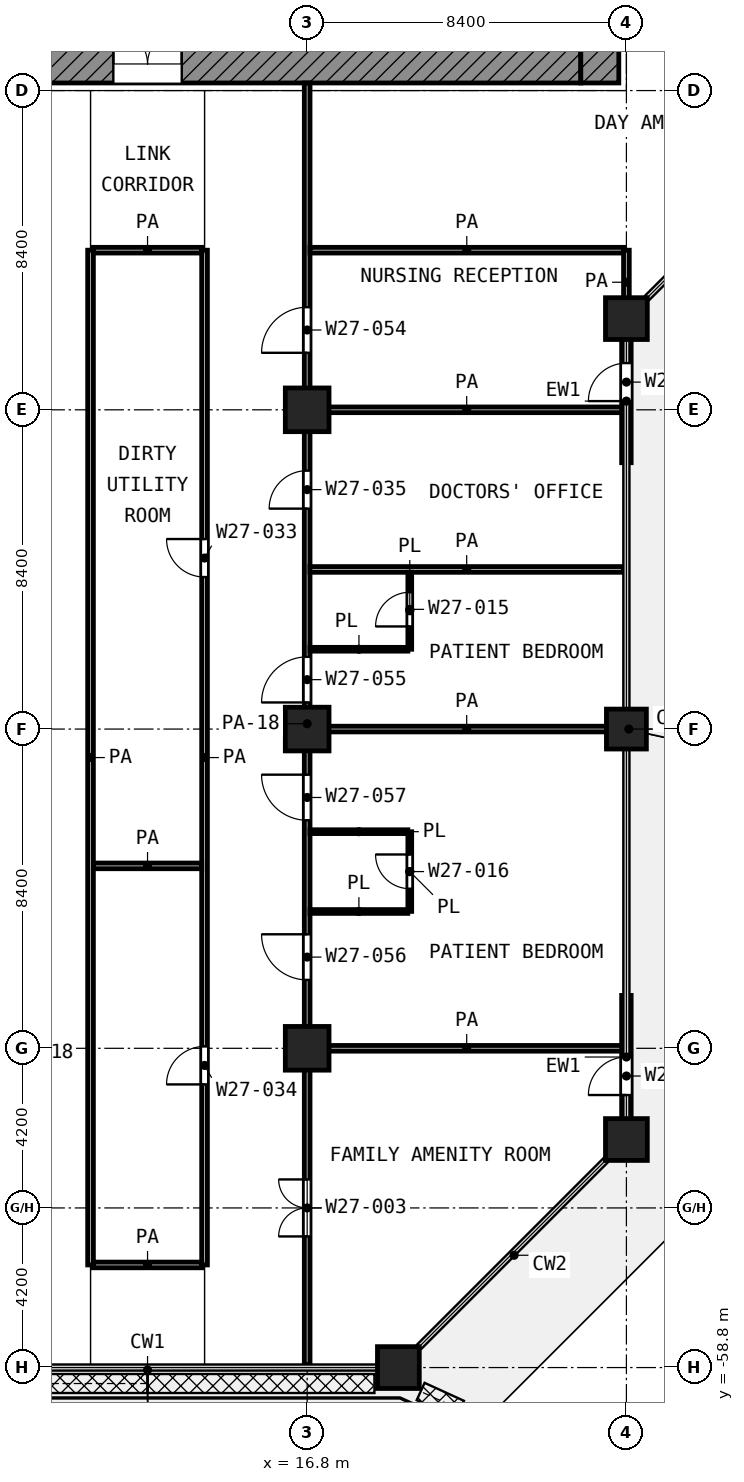
"""IFC4 building model, lengths in metres.
Left out: names, types, materials, properties, quantities, classifications, styles, units other than length and angle.
Written with IfcOpenShell. Run it as: python <this file> out.ifc"""

import sys

from ifc_helpers import new_model, si_unit, direction, frame, frame_2d, origin, origin_2d, place, context, subcontext, project, spatial, rectangle, extrude, element, fill, save


model = new_model("IFC4")
c1 = context("Model", 3, precision=1e-05, world=origin(), true_north=direction((0.0, 1.0)))
c2 = subcontext(c1, "Body", "Model", "MODEL_VIEW")
j1 = project(units=[si_unit("LENGTHUNIT", "METRE"), si_unit("PLANEANGLEUNIT", "RADIAN")], contexts=[c1])
p1 = place(None, origin())
s1 = spatial("IfcSite", under=j1, at=p1, CompositionType="ELEMENT")
p2 = place(p1, origin())
s2 = spatial("IfcBuilding", under=s1, at=p2, CompositionType="ELEMENT")
p3 = place(p2, frame((0.0, 0.0, 119.8)))
s3 = spatial("IfcBuildingStorey", under=s2, at=p3, CompositionType="ELEMENT", Elevation=119.8)
p4 = place(p3, frame((25.2, -31.2, 0.0), z_axis=(0.0, 0.0, 1.0), x_axis=(1.0, 0.0, 0.0)))
e1 = element("IfcColumn", 1, at=p4, inside=s3, PredefinedType="COLUMN", context=c2, shape_type="SweptSolid", body=[
    extrude(rectangle(XDim=1.1, YDim=1.1, at=origin_2d()), origin(), (0.0, 0.0, 1.0), 4.2),
])
for number, where, z_axis, x_axis in (
    (2, (16.8, -33.6, 0.0), (0.0, 0.0, 1.0), (1.0, 0.0, 0.0)),
    (3, (16.8, -42.0, 0.0), (0.0, 0.0, 1.0), (1.0, 0.0, 0.0)),
):
    element("IfcColumn", number, at=place(p3, frame(where, z_axis=z_axis, x_axis=x_axis)), inside=s3, PredefinedType="COLUMN", context=c2, shape_type="SweptSolid", body=[
        extrude(rectangle(XDim=1.15, YDim=1.15, at=origin_2d()), origin(), (0.0, 0.0, 1.0), 4.2),
    ])
p5 = place(p3, frame((25.2, -42.0, 0.0), z_axis=(0.0, 0.0, 1.0), x_axis=(1.0, 0.0, 0.0)))
e4 = element("IfcColumn", 4, at=p5, inside=s3, PredefinedType="COLUMN", context=c2, shape_type="SweptSolid", body=[
    extrude(rectangle(XDim=1.05, YDim=1.05, at=origin_2d()), origin(), (0.0, 0.0, 1.0), 4.2),
])
p6 = place(p3, frame((16.8, -50.4, 0.0), z_axis=(0.0, 0.0, 1.0), x_axis=(1.0, 0.0, 0.0)))
e5 = element("IfcColumn", 5, at=p6, inside=s3, PredefinedType="COLUMN", context=c2, shape_type="SweptSolid", body=[
    extrude(rectangle(XDim=1.15, YDim=1.15, at=origin_2d()), origin(), (0.0, 0.0, 1.0), 4.2),
])
for number, where, z_axis, x_axis in (
    (6, (25.2, -52.8, 0.0), (0.0, 0.0, 1.0), (1.0, 0.0, 0.0)),
    (7, (19.2, -58.8, 0.0), (0.0, 0.0, 1.0), (1.0, 0.0, 0.0)),
):
    element("IfcColumn", number, at=place(p3, frame(where, z_axis=z_axis, x_axis=x_axis)), inside=s3, PredefinedType="COLUMN", context=c2, shape_type="SweptSolid", body=[
        extrude(rectangle(XDim=1.1, YDim=1.1, at=origin_2d()), origin(), (0.0, 0.0, 1.0), 4.2),
    ])
p7 = place(p3, frame((25.2, -52.25, 0.0), z_axis=(0.0, 0.0, 1.0), x_axis=(0.0, 1.0, 0.0)))
e8 = element("IfcWall", 8, at=p7, inside=s3, PredefinedType="SOLIDWALL", context=c2, shape_type="SweptSolid", body=[
    extrude(rectangle(XDim=3.242, YDim=0.25, at=frame_2d((1.621, 0.0))), origin(), (0.0, 0.0, 1.0), 3.48),
])
p8 = place(p7, frame((0.621, 0.0, 0.0)))
e9 = element("IfcOpeningElement", 9, at=p8, cuts=e8, PredefinedType="OPENING", context=c2, shape_type="SweptSolid", body=[
    extrude(rectangle(XDim=1.0, YDim=2.1, at=frame_2d((0.5, 1.05))), frame((0.0, 0.135, 0.0), z_axis=(0.0, -1.0, 0.0), x_axis=(1.0, 0.0, 0.0)), (0.0, 0.0, 1.0), 0.27),
])
p9 = place(p3, frame((25.2, -34.992, 0.0), z_axis=(0.0, 0.0, 1.0), x_axis=(0.0, 1.0, 0.0)))
e10 = element("IfcWall", 10, at=p9, inside=s3, PredefinedType="SOLIDWALL", context=c2, shape_type="SweptSolid", body=[
    extrude(rectangle(XDim=3.242, YDim=0.25, at=frame_2d((1.621, 0.0))), origin(), (0.0, 0.0, 1.0), 3.48),
])
p10 = place(p9, frame((1.621, 0.0, 0.0)))
e11 = element("IfcOpeningElement", 11, at=p10, cuts=e10, PredefinedType="OPENING", context=c2, shape_type="SweptSolid", body=[
    extrude(rectangle(XDim=1.0, YDim=2.1, at=frame_2d((0.5, 1.05))), frame((0.0, 0.135, 0.0), z_axis=(0.0, -1.0, 0.0), x_axis=(1.0, 0.0, 0.0)), (0.0, 0.0, 1.0), 0.27),
])
p11 = place(p3, frame((5.4, -24.5, 0.0), z_axis=(0.0, 0.0, 1.0), x_axis=(1.0, 0.0, 0.0)))
e12 = element("IfcWall", 12, at=p11, inside=s3, PredefinedType="SHEAR", context=c2, shape_type="SweptSolid", body=[
    extrude(rectangle(XDim=18.6, YDim=1.0, at=frame_2d((9.3, 0.0))), origin(), (0.0, 0.0, 1.0), 3.6),
])
p12 = place(p11, frame((6.3, 0.0, 0.0)))
e13 = element("IfcOpeningElement", 13, at=p12, cuts=e12, PredefinedType="OPENING", context=c2, shape_type="SweptSolid", body=[
    extrude(rectangle(XDim=1.8, YDim=2.1, at=frame_2d((0.9, 1.05))), frame((0.0, 0.51, 0.0), z_axis=(0.0, -1.0, 0.0), x_axis=(1.0, 0.0, 0.0)), (0.0, 0.0, 1.0), 1.02),
])
p13 = place(p3, frame((24.5, -25.0, 0.0), z_axis=(0.0, 0.0, 1.0), x_axis=(0.0, 1.0, 0.0)))
e14 = element("IfcWall", 14, at=p13, inside=s3, PredefinedType="SHEAR", context=c2, shape_type="SweptSolid", body=[
    extrude(rectangle(XDim=1.0, YDim=1.0, at=frame_2d((0.5, 0.0))), origin(), (0.0, 0.0, 1.0), 3.6),
])
p14 = place(p3, frame((16.875, -46.8, 0.0), z_axis=(0.0, 0.0, 1.0), x_axis=(1.0, 0.0, 0.0)))
e15 = element("IfcWall", 15, at=p14, inside=s3, PredefinedType="PARTITIONING", context=c2, shape_type="SweptSolid", body=[
    extrude(rectangle(XDim=2.573, YDim=0.1, at=frame_2d((1.287, 0.0))), origin(), (0.0, 0.0, 1.0), 3.6),
])
p15 = place(p3, frame((16.875, -44.7, 0.0), z_axis=(0.0, 0.0, 1.0), x_axis=(1.0, 0.0, 0.0)))
e16 = element("IfcWall", 16, at=p15, inside=s3, PredefinedType="PARTITIONING", context=c2, shape_type="SweptSolid", body=[
    extrude(rectangle(XDim=2.574, YDim=0.1, at=frame_2d((1.287, 0.0))), origin(), (0.0, 0.0, 1.0), 3.6),
])
p16 = place(p3, frame((16.875, -39.9, 0.0), z_axis=(0.0, 0.0, 1.0), x_axis=(1.0, 0.0, 0.0)))
e17 = element("IfcWall", 17, at=p16, inside=s3, PredefinedType="PARTITIONING", context=c2, shape_type="SweptSolid", body=[
    extrude(rectangle(XDim=2.575, YDim=0.1, at=frame_2d((1.288, 0.0))), origin(), (0.0, 0.0, 1.0), 3.6),
])
p17 = place(p3, frame((19.5, -46.798, 0.0), z_axis=(0.0, 0.0, 1.0), x_axis=(0.0, 1.0, 0.0)))
e18 = element("IfcWall", 18, at=p17, inside=s3, PredefinedType="PARTITIONING", context=c2, shape_type="SweptSolid", body=[
    extrude(rectangle(XDim=2.096, YDim=0.1, at=frame_2d((1.048, 0.0))), origin(), (0.0, 0.0, 1.0), 3.6),
])
p18 = place(p17, frame((0.598, 0.0, 0.0)))
e19 = element("IfcOpeningElement", 19, at=p18, cuts=e18, PredefinedType="OPENING", context=c2, shape_type="SweptSolid", body=[
    extrude(rectangle(XDim=0.9, YDim=2.1, at=frame_2d((0.45, 1.05))), frame((0.0, 0.06, 0.0), z_axis=(0.0, -1.0, 0.0), x_axis=(1.0, 0.0, 0.0)), (0.0, 0.0, 1.0), 0.12),
])
p19 = place(p3, frame((19.5, -39.9, 0.0), z_axis=(0.0, 0.0, 1.0), x_axis=(0.0, 1.0, 0.0)))
e20 = element("IfcWall", 20, at=p19, inside=s3, PredefinedType="PARTITIONING", context=c2, shape_type="SweptSolid", body=[
    extrude(rectangle(XDim=2.025, YDim=0.1, at=frame_2d((1.012, 0.0))), origin(), (0.0, 0.0, 1.0), 3.6),
])
p20 = place(p19, frame((0.6, 0.0, 0.0)))
e21 = element("IfcOpeningElement", 21, at=p20, cuts=e20, PredefinedType="OPENING", context=c2, shape_type="SweptSolid", body=[
    extrude(rectangle(XDim=0.9, YDim=2.1, at=frame_2d((0.45, 1.05))), frame((0.0, 0.06, 0.0), z_axis=(0.0, -1.0, 0.0), x_axis=(1.0, 0.0, 0.0)), (0.0, 0.0, 1.0), 0.12),
])
p21 = place(p3, frame((11.175, -56.1, 0.0), z_axis=(0.0, 0.0, 1.0), x_axis=(1.0, 0.0, 0.0)))
e22 = element("IfcWall", 22, at=p21, inside=s3, PredefinedType="PARTITIONING", context=c2, shape_type="SweptSolid", body=[
    extrude(rectangle(XDim=2.85, YDim=0.15, at=frame_2d((1.425, 0.0))), origin(), (0.0, 0.0, 1.0), 3.6),
])
p22 = place(p3, frame((16.875, -50.4, 0.0), z_axis=(0.0, 0.0, 1.0), x_axis=(1.0, 0.0, 0.0)))
e23 = element("IfcWall", 23, at=p22, inside=s3, PredefinedType="PARTITIONING", context=c2, shape_type="SweptSolid", body=[
    extrude(rectangle(XDim=8.245, YDim=0.15, at=frame_2d((4.123, 0.0))), origin(), (0.0, 0.0, 1.0), 3.6),
])
p23 = place(p3, frame((11.175, -45.6, 0.0), z_axis=(0.0, 0.0, 1.0), x_axis=(1.0, 0.0, 0.0)))
e24 = element("IfcWall", 24, at=p23, inside=s3, PredefinedType="PARTITIONING", context=c2, shape_type="SweptSolid", body=[
    extrude(rectangle(XDim=2.85, YDim=0.15, at=frame_2d((1.425, 0.0))), origin(), (0.0, 0.0, 1.0), 3.6),
])
for number, where, z_axis, x_axis in (
    (25, (16.875, -42.0, 0.0), (0.0, 0.0, 1.0), (1.0, 0.0, 0.0)),
    (26, (16.875, -37.8, 0.0), (0.0, 0.0, 1.0), (1.0, 0.0, 0.0)),
    (27, (16.875, -33.6, 0.0), (0.0, 0.0, 1.0), (1.0, 0.0, 0.0)),
):
    element("IfcWall", number, at=place(p3, frame(where, z_axis=z_axis, x_axis=x_axis)), inside=s3, PredefinedType="PARTITIONING", context=c2, shape_type="SweptSolid", body=[
        extrude(rectangle(XDim=8.245, YDim=0.15, at=frame_2d((4.123, 0.0))), origin(), (0.0, 0.0, 1.0), 3.6),
    ])
p24 = place(p3, frame((11.175, -29.4, 0.0), z_axis=(0.0, 0.0, 1.0), x_axis=(1.0, 0.0, 0.0)))
e28 = element("IfcWall", 28, at=p24, inside=s3, PredefinedType="PARTITIONING", context=c2, shape_type="SweptSolid", body=[
    extrude(rectangle(XDim=2.85, YDim=0.15, at=frame_2d((1.425, 0.0))), origin(), (0.0, 0.0, 1.0), 3.6),
])
p25 = place(p3, frame((16.875, -29.4, 0.0), z_axis=(0.0, 0.0, 1.0), x_axis=(1.0, 0.0, 0.0)))
e29 = element("IfcWall", 29, at=p25, inside=s3, PredefinedType="PARTITIONING", context=c2, shape_type="SweptSolid", body=[
    extrude(rectangle(XDim=8.25, YDim=0.15, at=frame_2d((4.125, 0.0))), origin(), (0.0, 0.0, 1.0), 3.6),
])
p26 = place(p3, frame((11.1, -56.1, 0.0), z_axis=(0.0, 0.0, 1.0), x_axis=(0.0, 1.0, 0.0)))
e30 = element("IfcWall", 30, at=p26, inside=s3, PredefinedType="PARTITIONING", context=c2, shape_type="SweptSolid", body=[
    extrude(rectangle(XDim=26.7, YDim=0.15, at=frame_2d((13.35, 0.0))), origin(), (0.0, 0.0, 1.0), 3.6),
])
p27 = place(p3, frame((14.1, -56.1, 0.0), z_axis=(0.0, 0.0, 1.0), x_axis=(0.0, 1.0, 0.0)))
e31 = element("IfcWall", 31, at=p27, inside=s3, PredefinedType="PARTITIONING", context=c2, shape_type="SweptSolid", body=[
    extrude(rectangle(XDim=26.7, YDim=0.15, at=frame_2d((13.35, 0.0))), origin(), (0.0, 0.0, 1.0), 3.6),
])
p28 = place(p27, frame((18.1, 0.0, 0.0)))
e32 = element("IfcOpeningElement", 32, at=p28, cuts=e31, PredefinedType="OPENING", context=c2, shape_type="SweptSolid", body=[
    extrude(rectangle(XDim=1.0, YDim=2.1, at=frame_2d((0.5, 1.05))), frame((0.0, 0.085, 0.0), z_axis=(0.0, -1.0, 0.0), x_axis=(1.0, 0.0, 0.0)), (0.0, 0.0, 1.0), 0.17),
])
p29 = place(p27, frame((4.75, 0.0, 0.0)))
e33 = element("IfcOpeningElement", 33, at=p29, cuts=e31, PredefinedType="OPENING", context=c2, shape_type="SweptSolid", body=[
    extrude(rectangle(XDim=1.0, YDim=2.1, at=frame_2d((0.5, 1.05))), frame((0.0, 0.085, 0.0), z_axis=(0.0, -1.0, 0.0), x_axis=(1.0, 0.0, 0.0)), (0.0, 0.0, 1.0), 0.17),
])
p30 = place(p3, frame((16.8, -58.72, 0.0), z_axis=(0.0, 0.0, 1.0), x_axis=(0.0, 1.0, 0.0)))
e34 = element("IfcWall", 34, at=p30, inside=s3, PredefinedType="PARTITIONING", context=c2, shape_type="SweptSolid", body=[
    extrude(rectangle(XDim=33.72, YDim=0.15, at=frame_2d((16.86, 0.0))), origin(), (0.0, 0.0, 1.0), 2.7),
])
p31 = place(p30, frame((26.62, 0.0, 0.0)))
e35 = element("IfcOpeningElement", 35, at=p31, cuts=e34, PredefinedType="OPENING", context=c2, shape_type="SweptSolid", body=[
    extrude(rectangle(XDim=1.2, YDim=2.1, at=frame_2d((0.6, 1.05))), frame((0.0, 0.085, 0.0), z_axis=(0.0, -1.0, 0.0), x_axis=(1.0, 0.0, 0.0)), (0.0, 0.0, 1.0), 0.17),
])
p32 = place(p30, frame((22.52, 0.0, 0.0)))
e36 = element("IfcOpeningElement", 36, at=p32, cuts=e34, PredefinedType="OPENING", context=c2, shape_type="SweptSolid", body=[
    extrude(rectangle(XDim=1.0, YDim=2.1, at=frame_2d((0.5, 1.05))), frame((0.0, 0.085, 0.0), z_axis=(0.0, -1.0, 0.0), x_axis=(1.0, 0.0, 0.0)), (0.0, 0.0, 1.0), 0.17),
])
p33 = place(p30, frame((17.42, 0.0, 0.0)))
e37 = element("IfcOpeningElement", 37, at=p33, cuts=e34, PredefinedType="OPENING", context=c2, shape_type="SweptSolid", body=[
    extrude(rectangle(XDim=1.2, YDim=2.1, at=frame_2d((0.6, 1.05))), frame((0.0, 0.085, 0.0), z_axis=(0.0, -1.0, 0.0), x_axis=(1.0, 0.0, 0.0)), (0.0, 0.0, 1.0), 0.17),
])
p34 = place(p30, frame((10.12, 0.0, 0.0)))
e38 = element("IfcOpeningElement", 38, at=p34, cuts=e34, PredefinedType="OPENING", context=c2, shape_type="SweptSolid", body=[
    extrude(rectangle(XDim=1.2, YDim=2.1, at=frame_2d((0.6, 1.05))), frame((0.0, 0.085, 0.0), z_axis=(0.0, -1.0, 0.0), x_axis=(1.0, 0.0, 0.0)), (0.0, 0.0, 1.0), 0.17),
])
p35 = place(p30, frame((14.32, 0.0, 0.0)))
e39 = element("IfcOpeningElement", 39, at=p35, cuts=e34, PredefinedType="OPENING", context=c2, shape_type="SweptSolid", body=[
    extrude(rectangle(XDim=1.2, YDim=2.1, at=frame_2d((0.6, 1.05))), frame((0.0, 0.085, 0.0), z_axis=(0.0, -1.0, 0.0), x_axis=(1.0, 0.0, 0.0)), (0.0, 0.0, 1.0), 0.17),
])
p36 = place(p30, frame((3.37, 0.0, 0.0)))
e40 = element("IfcOpeningElement", 40, at=p36, cuts=e34, PredefinedType="OPENING", context=c2, shape_type="SweptSolid", body=[
    extrude(rectangle(XDim=1.5, YDim=2.1, at=frame_2d((0.75, 1.05))), frame((0.0, 0.085, 0.0), z_axis=(0.0, -1.0, 0.0), x_axis=(1.0, 0.0, 0.0)), (0.0, 0.0, 1.0), 0.17),
])
p37 = place(p3, frame((25.2, -31.087, 0.0), z_axis=(0.0, 0.0, 1.0), x_axis=(0.0, 1.0, 0.0)))
e41 = element("IfcWall", 41, at=p37, inside=s3, PredefinedType="PARTITIONING", context=c2, shape_type="SweptSolid", body=[
    extrude(rectangle(XDim=1.687, YDim=0.15, at=frame_2d((0.844, 0.0))), origin(), (0.0, 0.0, 1.0), 3.6),
])
p38 = place(p8, origin())
e42 = element("IfcDoor", 42, at=p38, inside=s3, OperationType="SINGLE_SWING_LEFT", PredefinedType="DOOR", context=c2, shape_type="SweptSolid", body=[
    extrude(rectangle(XDim=1.0, YDim=2.1, at=frame_2d((0.5, 1.05))), frame((0.0, 0.025, 0.0), z_axis=(0.0, -1.0, 0.0), x_axis=(1.0, 0.0, 0.0)), (0.0, 0.0, 1.0), 0.05),
])
fill(e9, e42)
p39 = place(p10, origin())
e43 = element("IfcDoor", 43, at=p39, inside=s3, OperationType="SINGLE_SWING_LEFT", PredefinedType="DOOR", context=c2, shape_type="SweptSolid", body=[
    extrude(rectangle(XDim=1.0, YDim=2.1, at=frame_2d((0.5, 1.05))), frame((0.0, 0.025, 0.0), z_axis=(0.0, -1.0, 0.0), x_axis=(1.0, 0.0, 0.0)), (0.0, 0.0, 1.0), 0.05),
])
fill(e11, e43)
p40 = place(p12, origin())
e44 = element("IfcDoor", 44, at=p40, inside=s3, OperationType="DOUBLE_DOOR_SINGLE_SWING", PredefinedType="DOOR", context=c2, shape_type="SweptSolid", body=[
    extrude(rectangle(XDim=1.8, YDim=2.1, at=frame_2d((0.9, 1.05))), frame((0.0, 0.025, 0.0), z_axis=(0.0, -1.0, 0.0), x_axis=(1.0, 0.0, 0.0)), (0.0, 0.0, 1.0), 0.05),
])
fill(e13, e44)
p41 = place(p28, origin())
e45 = element("IfcDoor", 45, at=p41, inside=s3, OperationType="SINGLE_SWING_RIGHT", PredefinedType="DOOR", context=c2, shape_type="SweptSolid", body=[
    extrude(rectangle(XDim=1.0, YDim=2.1, at=frame_2d((0.5, 1.05))), frame((0.0, 0.025, 0.0), z_axis=(0.0, -1.0, 0.0), x_axis=(1.0, 0.0, 0.0)), (0.0, 0.0, 1.0), 0.05),
])
fill(e32, e45)
p42 = place(p29, origin())
e46 = element("IfcDoor", 46, at=p42, inside=s3, OperationType="SINGLE_SWING_LEFT", PredefinedType="DOOR", context=c2, shape_type="SweptSolid", body=[
    extrude(rectangle(XDim=1.0, YDim=2.1, at=frame_2d((0.5, 1.05))), frame((0.0, 0.025, 0.0), z_axis=(0.0, -1.0, 0.0), x_axis=(1.0, 0.0, 0.0)), (0.0, 0.0, 1.0), 0.05),
])
fill(e33, e46)
p43 = place(p31, origin())
e47 = element("IfcDoor", 47, at=p43, inside=s3, OperationType="SINGLE_SWING_LEFT", PredefinedType="DOOR", context=c2, shape_type="SweptSolid", body=[
    extrude(rectangle(XDim=1.2, YDim=2.1, at=frame_2d((0.6, 1.05))), frame((0.0, 0.025, 0.0), z_axis=(0.0, -1.0, 0.0), x_axis=(1.0, 0.0, 0.0)), (0.0, 0.0, 1.0), 0.05),
])
fill(e35, e47)
p44 = place(p32, origin())
e48 = element("IfcDoor", 48, at=p44, inside=s3, OperationType="SINGLE_SWING_LEFT", PredefinedType="DOOR", context=c2, shape_type="SweptSolid", body=[
    extrude(rectangle(XDim=1.0, YDim=2.1, at=frame_2d((0.5, 1.05))), frame((0.0, 0.025, 0.0), z_axis=(0.0, -1.0, 0.0), x_axis=(1.0, 0.0, 0.0)), (0.0, 0.0, 1.0), 0.05),
])
fill(e36, e48)
p45 = place(p33, origin())
e49 = element("IfcDoor", 49, at=p45, inside=s3, OperationType="SINGLE_SWING_LEFT", PredefinedType="DOOR", context=c2, shape_type="SweptSolid", body=[
    extrude(rectangle(XDim=1.2, YDim=2.1, at=frame_2d((0.6, 1.05))), frame((0.0, 0.025, 0.0), z_axis=(0.0, -1.0, 0.0), x_axis=(1.0, 0.0, 0.0)), (0.0, 0.0, 1.0), 0.05),
])
fill(e37, e49)
p46 = place(p20, origin())
e50 = element("IfcDoor", 50, at=p46, inside=s3, OperationType="SINGLE_SWING_LEFT", PredefinedType="DOOR", context=c2, shape_type="SweptSolid", body=[
    extrude(rectangle(XDim=0.9, YDim=2.1, at=frame_2d((0.45, 1.05))), frame((0.0, 0.025, 0.0), z_axis=(0.0, -1.0, 0.0), x_axis=(1.0, 0.0, 0.0)), (0.0, 0.0, 1.0), 0.05),
])
fill(e21, e50)
p47 = place(p34, origin())
e51 = element("IfcDoor", 51, at=p47, inside=s3, OperationType="SINGLE_SWING_RIGHT", PredefinedType="DOOR", context=c2, shape_type="SweptSolid", body=[
    extrude(rectangle(XDim=1.2, YDim=2.1, at=frame_2d((0.6, 1.05))), frame((0.0, 0.025, 0.0), z_axis=(0.0, -1.0, 0.0), x_axis=(1.0, 0.0, 0.0)), (0.0, 0.0, 1.0), 0.05),
])
fill(e38, e51)
p48 = place(p35, origin())
e52 = element("IfcDoor", 52, at=p48, inside=s3, OperationType="SINGLE_SWING_RIGHT", PredefinedType="DOOR", context=c2, shape_type="SweptSolid", body=[
    extrude(rectangle(XDim=1.2, YDim=2.1, at=frame_2d((0.6, 1.05))), frame((0.0, 0.025, 0.0), z_axis=(0.0, -1.0, 0.0), x_axis=(1.0, 0.0, 0.0)), (0.0, 0.0, 1.0), 0.05),
])
fill(e39, e52)
p49 = place(p18, origin())
e53 = element("IfcDoor", 53, at=p49, inside=s3, OperationType="SINGLE_SWING_RIGHT", PredefinedType="DOOR", context=c2, shape_type="SweptSolid", body=[
    extrude(rectangle(XDim=0.9, YDim=2.1, at=frame_2d((0.45, 1.05))), frame((0.0, 0.025, 0.0), z_axis=(0.0, -1.0, 0.0), x_axis=(1.0, 0.0, 0.0)), (0.0, 0.0, 1.0), 0.05),
])
fill(e19, e53)
p50 = place(p36, origin())
e54 = element("IfcDoor", 54, at=p50, inside=s3, OperationType="DOUBLE_DOOR_SINGLE_SWING", PredefinedType="DOOR", context=c2, shape_type="SweptSolid", body=[
    extrude(rectangle(XDim=1.5, YDim=2.1, at=frame_2d((0.75, 1.05))), frame((0.0, 0.025, 0.0), z_axis=(0.0, -1.0, 0.0), x_axis=(1.0, 0.0, 0.0)), (0.0, 0.0, 1.0), 0.05),
])
fill(e40, e54)
save(model, sys.argv[1])
